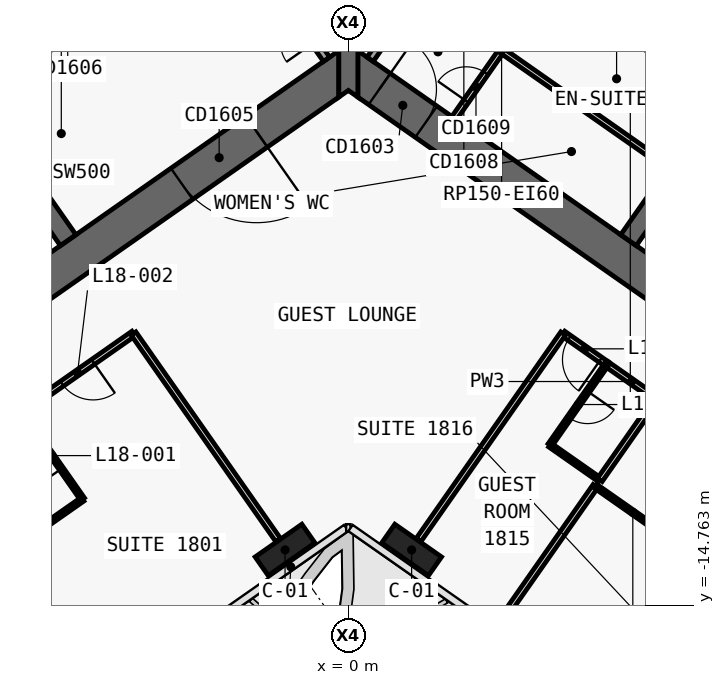
"""IFC4 building model, lengths in metres.
Left out: names, types, materials, properties, quantities, classifications, styles, units other than length and angle.
Written with IfcOpenShell. Run it as: python <this file> out.ifc"""

import sys

from ifc_helpers import new_model, si_unit, direction, frame, frame_2d, origin, origin_2d, place, context, subcontext, project, spatial, polyline, rectangle, outline, extrude, element, fill, save


model = new_model("IFC4")
c1 = context("Model", 3, precision=1e-05, world=origin(), true_north=direction((0.0, 1.0)))
c2 = subcontext(c1, "Body", "Model", "MODEL_VIEW")
j1 = project(units=[si_unit("LENGTHUNIT", "METRE"), si_unit("PLANEANGLEUNIT", "RADIAN")], contexts=[c1])
p1 = place(None, origin())
s1 = spatial("IfcSite", under=j1, at=p1, CompositionType="ELEMENT")
p2 = place(p1, origin())
s2 = spatial("IfcBuilding", under=s1, at=p2, CompositionType="ELEMENT")
p3 = place(p2, frame((0.0, 0.0, 90.5)))
s3 = spatial("IfcBuildingStorey", under=s2, at=p3, CompositionType="ELEMENT", Elevation=90.5)
p4 = place(p3, frame((0.037, 11.867, 0.0), z_axis=(0.0, 0.0, 1.0), x_axis=(-0.819155306259, -0.573571777746, 0.0)))
e1 = element("IfcWall", 1, at=p4, inside=s3, PredefinedType="SHEAR", context=c2, shape_type="SweptSolid", body=[
    extrude(outline(polyline([(33.837, 0.5), (0.7, 0.5), (0.0, -0.5), (33.837, -0.5), (33.837, 0.5)])), origin(), (0.0, 0.0, 1.0), 3.6),
])
p5 = place(p3, frame((0.037, -0.585, 0.0), z_axis=(0.0, 0.0, 1.0), x_axis=(-0.819157152511, -0.573569140985, 0.0)))
e2 = element("IfcWall", 2, at=p5, inside=s3, PredefinedType="SHEAR", context=c2, shape_type="SweptSolid", body=[
    extrude(outline(polyline([(26.695, 0.5), (0.7, 0.5), (0.0, -0.5), (26.695, -0.5), (26.695, 0.5)])), origin(), (0.0, 0.0, 1.0), 3.6),
])
p6 = place(p5, frame((2.995, 0.0, 0.0)))
e3 = element("IfcOpeningElement", 3, at=p6, cuts=e2, PredefinedType="OPENING", context=c2, shape_type="SweptSolid", body=[
    extrude(rectangle(XDim=2.4, YDim=2.1, at=frame_2d((1.2, 1.05))), frame((0.0, 0.51, 0.0), z_axis=(0.0, -1.0, 0.0), x_axis=(1.0, 0.0, 0.0)), (0.0, 0.0, 1.0), 1.02),
])
p7 = place(p5, frame((11.995, 0.0, 0.0)))
e4 = element("IfcOpeningElement", 4, at=p7, cuts=e2, PredefinedType="OPENING", context=c2, shape_type="SweptSolid", body=[
    extrude(rectangle(XDim=2.4, YDim=2.1, at=frame_2d((1.2, 1.05))), frame((0.0, 0.51, 0.0), z_axis=(0.0, -1.0, 0.0), x_axis=(1.0, 0.0, 0.0)), (0.0, 0.0, 1.0), 1.02),
])
p8 = place(p3, frame((-7.372, -5.162, 0.0), z_axis=(0.0, 0.0, 1.0), x_axis=(-0.573594173421, 0.819139624372, 0.0)))
e5 = element("IfcWall", 5, at=p8, inside=s3, PredefinedType="SHEAR", context=c2, shape_type="SweptSolid", body=[
    extrude(outline(polyline([(4.35, 0.25), (0.0, 0.25), (0.0, -0.25), (4.35, -0.25), (4.35, 0.25)])), origin(), (0.0, 0.0, 1.0), 3.6),
])
p9 = place(p3, frame((-2.638, 3.768, 0.0), z_axis=(0.0, 0.0, 1.0), x_axis=(-0.819148977158, -0.573580816643, 0.0)))
e6 = element("IfcWall", 6, at=p9, inside=s3, PredefinedType="SHEAR", context=c2, shape_type="SweptSolid", body=[
    extrude(outline(polyline([(26.0, 0.25), (0.0, 0.25), (0.0, -0.25), (26.0, -0.25), (26.0, 0.25)])), origin(), (0.0, 0.0, 1.0), 3.6),
])
p10 = place(p9, frame((1.169, 0.0, 0.0)))
e7 = element("IfcOpeningElement", 7, at=p10, cuts=e6, PredefinedType="OPENING", context=c2, shape_type="SweptSolid", body=[
    extrude(rectangle(XDim=1.1, YDim=2.1, at=frame_2d((0.55, 1.05))), frame((0.0, 0.26, 0.0), z_axis=(0.0, -1.0, 0.0), x_axis=(1.0, 0.0, 0.0)), (0.0, 0.0, 1.0), 0.52),
])
p11 = place(p9, frame((3.206, 0.0, 0.0)))
e8 = element("IfcOpeningElement", 8, at=p11, cuts=e6, PredefinedType="OPENING", context=c2, shape_type="SweptSolid", body=[
    extrude(rectangle(XDim=1.1, YDim=2.1, at=frame_2d((0.55, 1.05))), frame((0.0, 0.26, 0.0), z_axis=(0.0, -1.0, 0.0), x_axis=(1.0, 0.0, 0.0)), (0.0, 0.0, 1.0), 0.52),
])
p12 = place(p9, frame((5.244, 0.0, 0.0)))
e9 = element("IfcOpeningElement", 9, at=p12, cuts=e6, PredefinedType="OPENING", context=c2, shape_type="SweptSolid", body=[
    extrude(rectangle(XDim=1.1, YDim=2.1, at=frame_2d((0.55, 1.05))), frame((0.0, 0.26, 0.0), z_axis=(0.0, -1.0, 0.0), x_axis=(1.0, 0.0, 0.0)), (0.0, 0.0, 1.0), 0.52),
])
p13 = place(p9, frame((7.281, 0.0, 0.0)))
e10 = element("IfcOpeningElement", 10, at=p13, cuts=e6, PredefinedType="OPENING", context=c2, shape_type="SweptSolid", body=[
    extrude(rectangle(XDim=1.1, YDim=2.1, at=frame_2d((0.55, 1.05))), frame((0.0, 0.26, 0.0), z_axis=(0.0, -1.0, 0.0), x_axis=(1.0, 0.0, 0.0)), (0.0, 0.0, 1.0), 0.52),
])
p14 = place(p9, frame((9.688, 0.0, 0.0)))
e11 = element("IfcOpeningElement", 11, at=p14, cuts=e6, PredefinedType="OPENING", context=c2, shape_type="SweptSolid", body=[
    extrude(rectangle(XDim=1.1, YDim=2.1, at=frame_2d((0.55, 1.05))), frame((0.0, 0.26, 0.0), z_axis=(0.0, -1.0, 0.0), x_axis=(1.0, 0.0, 0.0)), (0.0, 0.0, 1.0), 0.52),
])
p15 = place(p9, frame((11.863, 0.0, 0.0)))
e12 = element("IfcOpeningElement", 12, at=p15, cuts=e6, PredefinedType="OPENING", context=c2, shape_type="SweptSolid", body=[
    extrude(rectangle(XDim=1.1, YDim=2.1, at=frame_2d((0.55, 1.05))), frame((0.0, 0.26, 0.0), z_axis=(0.0, -1.0, 0.0), x_axis=(1.0, 0.0, 0.0)), (0.0, 0.0, 1.0), 0.52),
])
p16 = place(p9, frame((14.038, 0.0, 0.0)))
e13 = element("IfcOpeningElement", 13, at=p16, cuts=e6, PredefinedType="OPENING", context=c2, shape_type="SweptSolid", body=[
    extrude(rectangle(XDim=1.1, YDim=2.1, at=frame_2d((0.55, 1.05))), frame((0.0, 0.26, 0.0), z_axis=(0.0, -1.0, 0.0), x_axis=(1.0, 0.0, 0.0)), (0.0, 0.0, 1.0), 0.52),
])
p17 = place(p9, frame((16.212, 0.0, 0.0)))
e14 = element("IfcOpeningElement", 14, at=p17, cuts=e6, PredefinedType="OPENING", context=c2, shape_type="SweptSolid", body=[
    extrude(rectangle(XDim=1.1, YDim=2.1, at=frame_2d((0.55, 1.05))), frame((0.0, 0.26, 0.0), z_axis=(0.0, -1.0, 0.0), x_axis=(1.0, 0.0, 0.0)), (0.0, 0.0, 1.0), 0.52),
])
p18 = place(p3, frame((-0.037, 11.867, 0.0), z_axis=(0.0, 0.0, 1.0), x_axis=(0.819155306259, -0.573571777746, 0.0)))
e15 = element("IfcWall", 15, at=p18, inside=s3, PredefinedType="SHEAR", context=c2, shape_type="SweptSolid", body=[
    extrude(outline(polyline([(33.837, 0.5), (0.0, 0.5), (0.7, -0.5), (33.837, -0.5), (33.837, 0.5)])), origin(), (0.0, 0.0, 1.0), 3.6),
])
p19 = place(p3, frame((-0.037, -0.585, 0.0), z_axis=(0.0, 0.0, 1.0), x_axis=(0.819157152511, -0.573569140985, 0.0)))
e16 = element("IfcWall", 16, at=p19, inside=s3, PredefinedType="SHEAR", context=c2, shape_type="SweptSolid", body=[
    extrude(outline(polyline([(26.695, 0.5), (0.0, 0.5), (0.7, -0.5), (26.695, -0.5), (26.695, 0.5)])), origin(), (0.0, 0.0, 1.0), 3.6),
])
p20 = place(p19, frame((1.045, 0.0, 0.0)))
e17 = element("IfcOpeningElement", 17, at=p20, cuts=e16, PredefinedType="OPENING", context=c2, shape_type="SweptSolid", body=[
    extrude(rectangle(XDim=1.5, YDim=2.1, at=frame_2d((0.75, 1.05))), frame((0.0, 0.51, 0.0), z_axis=(0.0, -1.0, 0.0), x_axis=(1.0, 0.0, 0.0)), (0.0, 0.0, 1.0), 1.02),
])
p21 = place(p19, frame((12.445, 0.0, 0.0)))
e18 = element("IfcOpeningElement", 18, at=p21, cuts=e16, PredefinedType="OPENING", context=c2, shape_type="SweptSolid", body=[
    extrude(rectangle(XDim=1.5, YDim=2.1, at=frame_2d((0.75, 1.05))), frame((0.0, 0.51, 0.0), z_axis=(0.0, -1.0, 0.0), x_axis=(1.0, 0.0, 0.0)), (0.0, 0.0, 1.0), 1.02),
])
p22 = place(p3, frame((7.372, -5.162, 0.0), z_axis=(0.0, 0.0, 1.0), x_axis=(0.573594173421, 0.819139624372, 0.0)))
e19 = element("IfcWall", 19, at=p22, inside=s3, PredefinedType="SHEAR", context=c2, shape_type="SweptSolid", body=[
    extrude(outline(polyline([(0.0, 0.25), (0.0, -0.25), (4.35, -0.25), (4.35, 0.25), (0.0, 0.25)])), origin(), (0.0, 0.0, 1.0), 3.6),
])
p23 = place(p3, frame((2.638, 3.768, 0.0), z_axis=(0.0, 0.0, 1.0), x_axis=(0.819148977158, -0.573580816643, 0.0)))
e20 = element("IfcWall", 20, at=p23, inside=s3, PredefinedType="SHEAR", context=c2, shape_type="SweptSolid", body=[
    extrude(outline(polyline([(0.0, 0.25), (0.0, -0.25), (26.0, -0.25), (26.0, 0.25), (0.0, 0.25)])), origin(), (0.0, 0.0, 1.0), 3.6),
])
p24 = place(p23, frame((9.637, 0.0, 0.0)))
e21 = element("IfcOpeningElement", 21, at=p24, cuts=e20, PredefinedType="OPENING", context=c2, shape_type="SweptSolid", body=[
    extrude(rectangle(XDim=1.2, YDim=2.1, at=frame_2d((0.6, 1.05))), frame((0.0, 0.26, 0.0), z_axis=(0.0, -1.0, 0.0), x_axis=(1.0, 0.0, 0.0)), (0.0, 0.0, 1.0), 0.52),
])
p25 = place(p23, frame((11.812, 0.0, 0.0)))
e22 = element("IfcOpeningElement", 22, at=p25, cuts=e20, PredefinedType="OPENING", context=c2, shape_type="SweptSolid", body=[
    extrude(rectangle(XDim=1.2, YDim=2.1, at=frame_2d((0.6, 1.05))), frame((0.0, 0.26, 0.0), z_axis=(0.0, -1.0, 0.0), x_axis=(1.0, 0.0, 0.0)), (0.0, 0.0, 1.0), 0.52),
])
p26 = place(p23, frame((13.988, 0.0, 0.0)))
e23 = element("IfcOpeningElement", 23, at=p26, cuts=e20, PredefinedType="OPENING", context=c2, shape_type="SweptSolid", body=[
    extrude(rectangle(XDim=1.2, YDim=2.1, at=frame_2d((0.6, 1.05))), frame((0.0, 0.26, 0.0), z_axis=(0.0, -1.0, 0.0), x_axis=(1.0, 0.0, 0.0)), (0.0, 0.0, 1.0), 0.52),
])
p27 = place(p23, frame((16.262, 0.0, 0.0)))
e24 = element("IfcOpeningElement", 24, at=p27, cuts=e20, PredefinedType="OPENING", context=c2, shape_type="SweptSolid", body=[
    extrude(rectangle(XDim=1.0, YDim=2.1, at=frame_2d((0.5, 1.05))), frame((0.0, 0.26, 0.0), z_axis=(0.0, -1.0, 0.0), x_axis=(1.0, 0.0, 0.0)), (0.0, 0.0, 1.0), 0.52),
])
p28 = place(p3, frame((0.0, -1.396, 0.0), z_axis=(0.0, 0.0, 1.0), x_axis=(0.0, 1.0, 0.0)))
e25 = element("IfcWall", 25, at=p28, inside=s3, PredefinedType="SHEAR", context=c2, shape_type="SweptSolid", body=[
    extrude(outline(polyline([(0.0, -0.25), (0.175, -0.25), (1.221, -0.25), (12.452, -0.25), (13.848, -0.25), (13.857, -0.25), (13.968, -0.172), (13.848, 0.0), (13.968, 0.172), (13.857, 0.25), (13.848, 0.25), (12.452, 0.25), (1.221, 0.25), (0.175, 0.25), (0.0, 0.25), (0.175, 0.0), (0.0, -0.25)])), origin(), (0.0, 0.0, 1.0), 3.6),
])
for number, where, z_axis, x_axis in (
    (26, (-1.665, -13.313, 0.0), (0.0, 0.0, 1.0), (-0.819, -0.574, 0.0)),
    (27, (1.665, -13.313, 0.0), (0.0, 0.0, 1.0), (0.819, -0.574, 0.0)),
):
    element("IfcColumn", number, at=place(p3, frame(where, z_axis=z_axis, x_axis=x_axis)), inside=s3, PredefinedType="COLUMN", context=c2, shape_type="SweptSolid", body=[
        extrude(rectangle(XDim=1.5, YDim=0.6, at=origin_2d()), origin(), (0.0, 0.0, 1.0), 3.6),
    ])
p29 = place(p3, frame((2.785, -1.95, 0.0), z_axis=(0.0, 0.0, 1.0), x_axis=(0.57356780395, 0.819158088694, 0.0)))
e28 = element("IfcWall", 28, at=p29, inside=s3, PredefinedType="PARTITIONING", context=c2, shape_type="SweptSolid", body=[
    extrude(rectangle(XDim=4.35, YDim=0.15, at=frame_2d((2.175, 0.0))), origin(), (0.0, 0.0, 1.0), 3.32),
])
p30 = place(p29, frame((0.55, 0.0, 0.0)))
e29 = element("IfcOpeningElement", 29, at=p30, cuts=e28, PredefinedType="OPENING", context=c2, shape_type="SweptSolid", body=[
    extrude(rectangle(XDim=0.9, YDim=2.1, at=frame_2d((0.45, 1.05))), frame((0.0, 0.085, 0.0), z_axis=(0.0, -1.0, 0.0), x_axis=(1.0, 0.0, 0.0)), (0.0, 0.0, 1.0), 0.17),
])
p31 = place(p29, frame((2.825, 0.0, 0.0)))
e30 = element("IfcOpeningElement", 30, at=p31, cuts=e28, PredefinedType="OPENING", context=c2, shape_type="SweptSolid", body=[
    extrude(rectangle(XDim=0.9, YDim=2.1, at=frame_2d((0.45, 1.05))), frame((0.0, 0.085, 0.0), z_axis=(0.0, -1.0, 0.0), x_axis=(1.0, 0.0, 0.0)), (0.0, 0.0, 1.0), 0.17),
])
p32 = place(p3, frame((4.033, -0.168, 0.0), z_axis=(0.0, 0.0, 1.0), x_axis=(0.819146154531, -0.573584847705, 0.0)))
e31 = element("IfcWall", 31, at=p32, inside=s3, PredefinedType="PARTITIONING", context=c2, shape_type="SweptSolid", body=[
    extrude(rectangle(XDim=5.35, YDim=0.15, at=frame_2d((2.675, 0.0))), origin(), (0.0, 0.0, 1.0), 3.32),
])
p33 = place(p3, frame((-0.573, -0.402, 0.0), z_axis=(0.0, 0.0, 1.0), x_axis=(-0.57356780395, 0.819158088694, 0.0)))
e32 = element("IfcWall", 32, at=p33, inside=s3, PredefinedType="SOLIDWALL", context=c2, shape_type="SweptSolid", body=[
    extrude(rectangle(XDim=4.35, YDim=0.2, at=frame_2d((2.175, 0.0))), origin(), (0.0, 0.0, 1.0), 3.32),
])
p34 = place(p33, frame((0.55, 0.0, 0.0)))
e33 = element("IfcOpeningElement", 33, at=p34, cuts=e32, PredefinedType="OPENING", context=c2, shape_type="SweptSolid", body=[
    extrude(rectangle(XDim=0.9, YDim=2.1, at=frame_2d((0.45, 1.05))), frame((0.0, 0.11, 0.0), z_axis=(0.0, -1.0, 0.0), x_axis=(1.0, 0.0, 0.0)), (0.0, 0.0, 1.0), 0.22),
])
p35 = place(p3, frame((0.573, -0.402, 0.0), z_axis=(0.0, 0.0, 1.0), x_axis=(0.57356780395, 0.819158088694, 0.0)))
e34 = element("IfcWall", 34, at=p35, inside=s3, PredefinedType="SOLIDWALL", context=c2, shape_type="SweptSolid", body=[
    extrude(rectangle(XDim=4.35, YDim=0.2, at=frame_2d((2.175, 0.0))), origin(), (0.0, 0.0, 1.0), 3.32),
])
p36 = place(p35, frame((0.55, 0.0, 0.0)))
e35 = element("IfcOpeningElement", 35, at=p36, cuts=e34, PredefinedType="OPENING", context=c2, shape_type="SweptSolid", body=[
    extrude(rectangle(XDim=0.9, YDim=2.1, at=frame_2d((0.45, 1.05))), frame((0.0, 0.11, 0.0), z_axis=(0.0, -1.0, 0.0), x_axis=(1.0, 0.0, 0.0)), (0.0, 0.0, 1.0), 0.22),
])
p37 = place(p3, frame((6.799, -8.423, 0.0), z_axis=(0.0, 0.0, 1.0), x_axis=(-0.819207359301, 0.573497430219, 0.0)))
e36 = element("IfcWall", 36, at=p37, inside=s3, PredefinedType="PARTITIONING", context=c2, shape_type="SweptSolid", body=[
    extrude(rectangle(XDim=1.401, YDim=0.15, at=frame_2d((0.7, 0.0))), origin(), (0.0, 0.0, 1.0), 2.6),
])
p38 = place(p37, frame((0.201, 0.0, 0.0)))
e37 = element("IfcOpeningElement", 37, at=p38, cuts=e36, PredefinedType="OPENING", context=c2, shape_type="SweptSolid", body=[
    extrude(rectangle(XDim=1.0, YDim=2.1, at=frame_2d((0.5, 1.05))), frame((0.0, 0.085, 0.0), z_axis=(0.0, -1.0, 0.0), x_axis=(1.0, 0.0, 0.0)), (0.0, 0.0, 1.0), 0.17),
])
p39 = place(p3, frame((8.111, -9.342, 0.0), z_axis=(0.0, 0.0, 1.0), x_axis=(-0.8190674132, 0.573697283098, 0.0)))
e38 = element("IfcWall", 38, at=p39, inside=s3, PredefinedType="PARTITIONING", context=c2, shape_type="SweptSolid", body=[
    extrude(rectangle(XDim=1.604, YDim=0.15, at=frame_2d((0.802, 0.0))), origin(), (0.0, 0.0, 1.0), 3.32),
])
p40 = place(p3, frame((-5.652, -7.62, 0.0), z_axis=(0.0, 0.0, 1.0), x_axis=(-0.819149096931, -0.573580645591, 0.0)))
e39 = element("IfcWall", 39, at=p40, inside=s3, PredefinedType="PARTITIONING", context=c2, shape_type="SweptSolid", body=[
    extrude(rectangle(XDim=3.601, YDim=0.15, at=frame_2d((1.8, 0.0))), origin(), (0.0, 0.0, 1.0), 2.6),
])
p41 = place(p40, frame((1.3, 0.0, 0.0)))
e40 = element("IfcOpeningElement", 40, at=p41, cuts=e39, PredefinedType="OPENING", context=c2, shape_type="SweptSolid", body=[
    extrude(rectangle(XDim=1.0, YDim=2.1, at=frame_2d((0.5, 1.05))), frame((0.0, 0.085, 0.0), z_axis=(0.0, -1.0, 0.0), x_axis=(1.0, 0.0, 0.0)), (0.0, 0.0, 1.0), 0.17),
])
p42 = place(p3, frame((6.798, -8.422, 0.0), z_axis=(0.0, 0.0, 1.0), x_axis=(-0.573537965655, -0.819178980414, 0.0)))
e41 = element("IfcWall", 41, at=p42, inside=s3, PredefinedType="PARTITIONING", context=c2, shape_type="SweptSolid", body=[
    extrude(rectangle(XDim=2.6, YDim=0.12, at=frame_2d((1.3, 0.0))), origin(), (0.0, 0.0, 1.0), 3.32),
])
p43 = place(p42, frame((0.875, 0.0, 0.0)))
e42 = element("IfcOpeningElement", 42, at=p43, cuts=e41, PredefinedType="OPENING", context=c2, shape_type="SweptSolid", body=[
    extrude(rectangle(XDim=0.85, YDim=2.05, at=frame_2d((0.425, 1.025))), frame((0.0, 0.07, 0.0), z_axis=(0.0, -1.0, 0.0), x_axis=(1.0, 0.0, 0.0)), (0.0, 0.0, 1.0), 0.14),
])
p44 = place(p3, frame((5.307, -10.553, 0.0), z_axis=(0.0, 0.0, 1.0), x_axis=(0.819131543282, -0.57360571371, 0.0)))
e43 = element("IfcWall", 43, at=p44, inside=s3, PredefinedType="PARTITIONING", context=c2, shape_type="SweptSolid", body=[
    extrude(rectangle(XDim=1.6, YDim=0.12, at=frame_2d((0.8, 0.0))), origin(), (0.0, 0.0, 1.0), 3.32),
])
p45 = place(p3, frame((6.504, -11.633, 0.0), z_axis=(0.0, 0.0, 1.0), x_axis=(-0.573556991349, -0.819165659482, 0.0)))
e44 = element("IfcWall", 44, at=p45, inside=s3, PredefinedType="PARTITIONING", context=c2, shape_type="SweptSolid", body=[
    extrude(rectangle(XDim=4.501, YDim=0.15, at=frame_2d((2.25, 0.0))), origin(), (0.0, 0.0, 1.0), 2.5),
])
p46 = place(p3, frame((1.849, -13.051, 0.0), z_axis=(0.0, 0.0, 1.0), x_axis=(0.57357355307, 0.819154063177, 0.0)))
e45 = element("IfcWall", 45, at=p46, inside=s3, PredefinedType="PARTITIONING", context=c2, shape_type="SweptSolid", body=[
    extrude(rectangle(XDim=6.63, YDim=0.15, at=frame_2d((3.315, 0.0))), origin(), (0.0, 0.0, 1.0), 2.6),
])
p47 = place(p3, frame((8.109, -9.34, 0.0), z_axis=(0.0, 0.0, 1.0), x_axis=(-0.573537965655, -0.819178980414, 0.0)))
e46 = element("IfcWall", 46, at=p47, inside=s3, PredefinedType="PARTITIONING", context=c2, shape_type="SweptSolid", body=[
    extrude(rectangle(XDim=2.6, YDim=0.15, at=frame_2d((1.3, 0.0))), origin(), (0.0, 0.0, 1.0), 3.32),
])
p48 = place(p3, frame((6.502, -11.635, 0.0), z_axis=(0.0, 0.0, 1.0), x_axis=(0.819141114317, -0.573592045652, 0.0)))
e47 = element("IfcWall", 47, at=p48, inside=s3, PredefinedType="PARTITIONING", context=c2, shape_type="SweptSolid", body=[
    extrude(rectangle(XDim=2.4, YDim=0.12, at=frame_2d((1.2, 0.0))), origin(), (0.0, 0.0, 1.0), 3.32),
])
p49 = place(p3, frame((-1.849, -13.051, 0.0), z_axis=(0.0, 0.0, 1.0), x_axis=(-0.573575988258, 0.819152358047, 0.0)))
e48 = element("IfcWall", 48, at=p49, inside=s3, PredefinedType="PARTITIONING", context=c2, shape_type="SweptSolid", body=[
    extrude(rectangle(XDim=6.632, YDim=0.15, at=frame_2d((3.316, 0.0))), origin(), (0.0, 0.0, 1.0), 2.6),
])
p50 = place(p3, frame((-8.96, -13.355, 0.0), z_axis=(0.0, 0.0, 1.0), x_axis=(0.819188907105, 0.573523787192, 0.0)))
e49 = element("IfcWall", 49, at=p50, inside=s3, PredefinedType="PARTITIONING", context=c2, shape_type="SweptSolid", body=[
    extrude(rectangle(XDim=2.4, YDim=0.12, at=frame_2d((1.2, 0.0))), origin(), (0.0, 0.0, 1.0), 3.32),
])
p51 = place(p3, frame((-6.994, -11.978, 0.0), z_axis=(0.0, 0.0, 1.0), x_axis=(-0.573550118428, 0.819170471667, 0.0)))
e50 = element("IfcWall", 50, at=p51, inside=s3, PredefinedType="PARTITIONING", context=c2, shape_type="SweptSolid", body=[
    extrude(rectangle(XDim=2.8, YDim=0.12, at=frame_2d((1.4, 0.0))), origin(), (0.0, 0.0, 1.0), 3.32),
])
p52 = place(p51, frame((0.975, 0.0, 0.0)))
e51 = element("IfcOpeningElement", 51, at=p52, cuts=e50, PredefinedType="OPENING", context=c2, shape_type="SweptSolid", body=[
    extrude(rectangle(XDim=0.85, YDim=2.05, at=frame_2d((0.425, 1.025))), frame((0.0, 0.07, 0.0), z_axis=(0.0, -1.0, 0.0), x_axis=(1.0, 0.0, 0.0)), (0.0, 0.0, 1.0), 0.14),
])
p53 = place(p3, frame((-6.379, -17.041, 0.0), z_axis=(0.0, 0.0, 1.0), x_axis=(-0.573564311442, 0.819160534108, 0.0)))
e52 = element("IfcWall", 52, at=p53, inside=s3, PredefinedType="PARTITIONING", context=c2, shape_type="SweptSolid", body=[
    extrude(rectangle(XDim=4.499, YDim=0.15, at=frame_2d((2.25, 0.0))), origin(), (0.0, 0.0, 1.0), 2.5),
])
p54 = place(p6, origin())
e53 = element("IfcDoor", 53, at=p54, inside=s3, OperationType="DOUBLE_DOOR_SINGLE_SWING", PredefinedType="DOOR", context=c2, shape_type="SweptSolid", body=[
    extrude(rectangle(XDim=2.4, YDim=2.1, at=frame_2d((1.2, 1.05))), frame((0.0, 0.025, 0.0), z_axis=(0.0, -1.0, 0.0), x_axis=(1.0, 0.0, 0.0)), (0.0, 0.0, 1.0), 0.05),
])
fill(e3, e53)
p55 = place(p30, origin())
e54 = element("IfcDoor", 54, at=p55, inside=s3, OperationType="SINGLE_SWING_RIGHT", PredefinedType="DOOR", context=c2, shape_type="SweptSolid", body=[
    extrude(rectangle(XDim=0.9, YDim=2.1, at=frame_2d((0.45, 1.05))), frame((0.0, 0.025, 0.0), z_axis=(0.0, -1.0, 0.0), x_axis=(1.0, 0.0, 0.0)), (0.0, 0.0, 1.0), 0.05),
])
fill(e29, e54)
p56 = place(p20, origin())
e55 = element("IfcDoor", 55, at=p56, inside=s3, OperationType="SINGLE_SWING_RIGHT", PredefinedType="DOOR", context=c2, shape_type="SweptSolid", body=[
    extrude(rectangle(XDim=1.5, YDim=2.1, at=frame_2d((0.75, 1.05))), frame((0.0, 0.025, 0.0), z_axis=(0.0, -1.0, 0.0), x_axis=(1.0, 0.0, 0.0)), (0.0, 0.0, 1.0), 0.05),
])
fill(e17, e55)
p57 = place(p52, origin())
e56 = element("IfcDoor", 56, at=p57, inside=s3, OperationType="SINGLE_SWING_LEFT", PredefinedType="DOOR", context=c2, shape_type="SweptSolid", body=[
    extrude(rectangle(XDim=0.85, YDim=2.05, at=frame_2d((0.425, 1.025))), frame((0.0, 0.025, 0.0), z_axis=(0.0, -1.0, 0.0), x_axis=(1.0, 0.0, 0.0)), (0.0, 0.0, 1.0), 0.05),
])
fill(e51, e56)
p58 = place(p41, origin())
e57 = element("IfcDoor", 57, at=p58, inside=s3, OperationType="SINGLE_SWING_RIGHT", PredefinedType="DOOR", context=c2, shape_type="SweptSolid", body=[
    extrude(rectangle(XDim=1.0, YDim=2.1, at=frame_2d((0.5, 1.05))), frame((0.0, 0.025, 0.0), z_axis=(0.0, -1.0, 0.0), x_axis=(1.0, 0.0, 0.0)), (0.0, 0.0, 1.0), 0.05),
])
fill(e40, e57)
p59 = place(p43, origin())
e58 = element("IfcDoor", 58, at=p59, inside=s3, OperationType="SINGLE_SWING_RIGHT", PredefinedType="DOOR", context=c2, shape_type="SweptSolid", body=[
    extrude(rectangle(XDim=0.85, YDim=2.05, at=frame_2d((0.425, 1.025))), frame((0.0, 0.025, 0.0), z_axis=(0.0, -1.0, 0.0), x_axis=(1.0, 0.0, 0.0)), (0.0, 0.0, 1.0), 0.05),
])
fill(e42, e58)
p60 = place(p38, origin())
e59 = element("IfcDoor", 59, at=p60, inside=s3, OperationType="SINGLE_SWING_LEFT", PredefinedType="DOOR", context=c2, shape_type="SweptSolid", body=[
    extrude(rectangle(XDim=1.0, YDim=2.1, at=frame_2d((0.5, 1.05))), frame((0.0, 0.025, 0.0), z_axis=(0.0, -1.0, 0.0), x_axis=(1.0, 0.0, 0.0)), (0.0, 0.0, 1.0), 0.05),
])
fill(e37, e59)
save(model, sys.argv[1])
